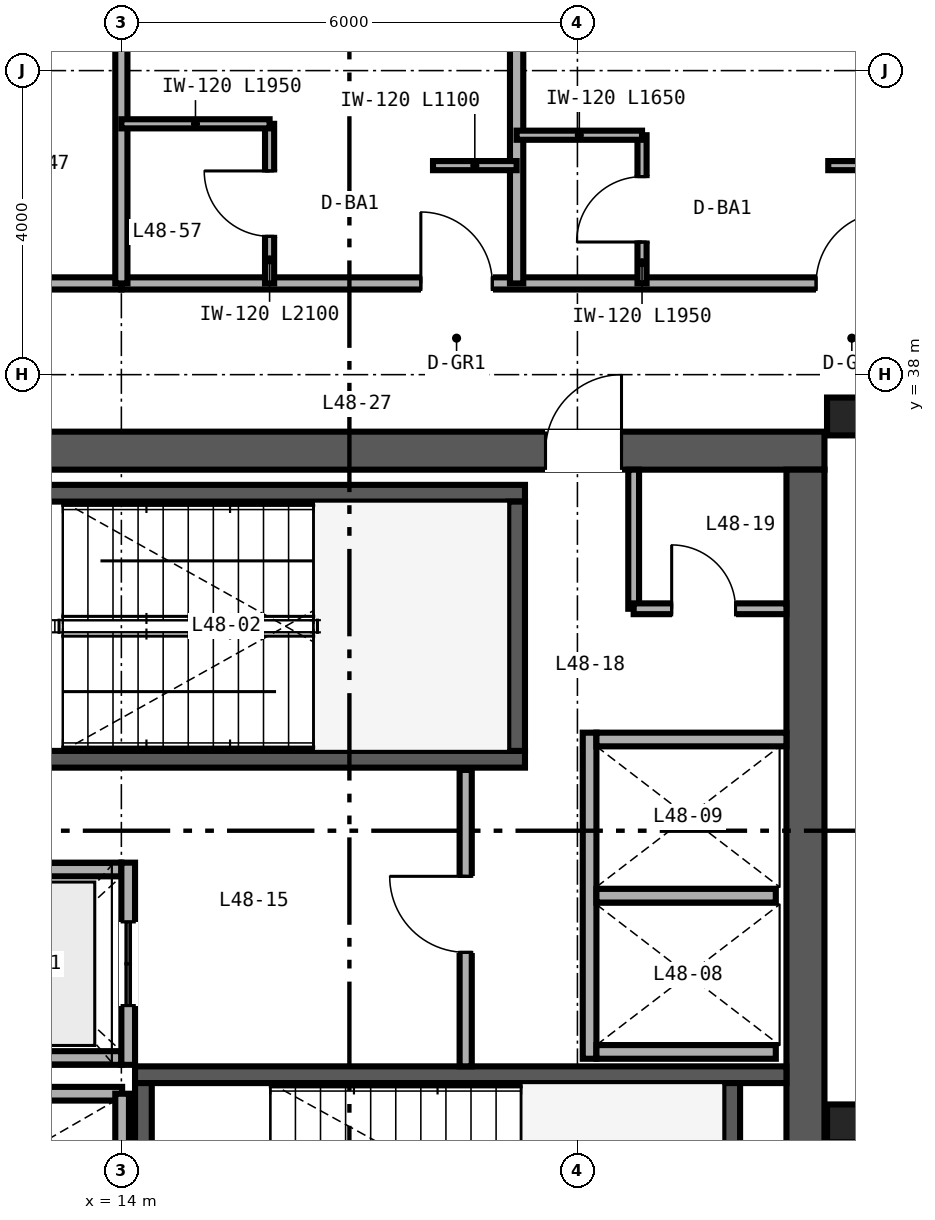
"""IFC4 building model, lengths in metres.
Left out: names, types, materials, properties, quantities, classifications, styles, units other than length and angle.
Written with IfcOpenShell. Run it as: python <this file> out.ifc"""

import sys

from ifc_helpers import new_model, si_unit, direction, frame, frame_2d, origin, origin_2d, place, context, subcontext, project, spatial, rectangle, i_section, extrude, source, transform, mapped, element, fill, save


model = new_model("IFC4")
c1 = context("Model", 3, precision=1e-05, world=origin(), true_north=direction((0.0, 1.0)))
c2 = subcontext(c1, "Body", "Model", "MODEL_VIEW")
j1 = project(units=[si_unit("LENGTHUNIT", "METRE"), si_unit("PLANEANGLEUNIT", "RADIAN")], contexts=[c1])
p1 = place(None, origin())
s1 = spatial("IfcSite", under=j1, at=p1, CompositionType="ELEMENT")
p2 = place(p1, origin())
s2 = spatial("IfcBuilding", under=s1, at=p2, CompositionType="ELEMENT")
p3 = place(p2, frame((0.0, 0.0, 192.0)))
s3 = spatial("IfcBuildingStorey", under=s2, at=p3, CompositionType="ELEMENT", Elevation=192.0)
p4 = place(p3, frame((10.75, 37.0, 0.0), z_axis=(0.0, 0.0, 1.0), x_axis=(1.0, 0.0, 0.0)))
e1 = element("IfcWall", 1, at=p4, inside=s3, PredefinedType="SHEAR", context=c2, shape_type="SweptSolid", body=[
    extrude(rectangle(XDim=12.5, YDim=0.5, at=frame_2d((6.25, 0.0))), origin(), (0.0, 0.0, 1.0), 3.37),
])
p5 = place(p4, frame((8.83, 0.0, 0.0)))
e2 = element("IfcOpeningElement", 2, at=p5, cuts=e1, PredefinedType="OPENING", context=c2, shape_type="SweptSolid", body=[
    extrude(rectangle(XDim=1.0, YDim=2.15, at=frame_2d((0.5, 1.075))), frame((0.0, 0.26, 0.0), z_axis=(0.0, -1.0, 0.0), x_axis=(1.0, 0.0, 0.0)), (0.0, 0.0, 1.0), 0.52),
])
p6 = place(p3, frame((23.0, 15.25, 0.0), z_axis=(0.0, 0.0, 1.0), x_axis=(0.0, 1.0, 0.0)))
e3 = element("IfcWall", 3, at=p6, inside=s3, PredefinedType="SHEAR", context=c2, shape_type="SweptSolid", body=[
    extrude(rectangle(XDim=21.5, YDim=0.5, at=frame_2d((10.75, 0.0))), origin(), (0.0, 0.0, 1.0), 3.37),
])
p7 = place(p3, frame((11.25, 32.94, 0.0), z_axis=(0.0, 0.0, 1.0), x_axis=(1.0, 0.0, 0.0)))
e4 = element("IfcWall", 4, at=p7, inside=s3, PredefinedType="SHEAR", context=c2, shape_type="SweptSolid", body=[
    extrude(rectangle(XDim=8.06, YDim=0.22, at=frame_2d((4.03, 0.0))), origin(), (0.0, 0.0, 1.0), 3.4),
])
p8 = place(p7, frame((0.67, 0.0, 0.0)))
e5 = element("IfcOpeningElement", 5, at=p8, cuts=e4, PredefinedType="OPENING", context=c2, shape_type="SweptSolid", body=[
    extrude(rectangle(XDim=1.05, YDim=2.15, at=frame_2d((0.525, 1.075))), frame((0.0, 0.12, 0.0), z_axis=(0.0, -1.0, 0.0), x_axis=(1.0, 0.0, 0.0)), (0.0, 0.0, 1.0), 0.24),
])
p9 = place(p3, frame((11.25, 36.44, 0.0), z_axis=(0.0, 0.0, 1.0), x_axis=(1.0, 0.0, 0.0)))
e6 = element("IfcWall", 6, at=p9, inside=s3, PredefinedType="SHEAR", context=c2, shape_type="SweptSolid", body=[
    extrude(rectangle(XDim=8.06, YDim=0.22, at=frame_2d((4.03, 0.0))), origin(), (0.0, 0.0, 1.0), 3.4),
])
p10 = place(p3, frame((19.2, 33.05, 0.0), z_axis=(0.0, 0.0, 1.0), x_axis=(0.0, 1.0, 0.0)))
e7 = element("IfcWall", 7, at=p10, inside=s3, PredefinedType="SHEAR", context=c2, shape_type="SweptSolid", body=[
    extrude(rectangle(XDim=3.28, YDim=0.22, at=frame_2d((1.64, 0.0))), origin(), (0.0, 0.0, 1.0), 3.4),
])
p11 = place(p3, frame((14.18, 28.79, 0.0), z_axis=(0.0, 0.0, 1.0), x_axis=(1.0, 0.0, 0.0)))
e8 = element("IfcWall", 8, at=p11, inside=s3, PredefinedType="SHEAR", context=c2, shape_type="SweptSolid", body=[
    extrude(rectangle(XDim=8.57, YDim=0.22, at=frame_2d((4.285, 0.0))), origin(), (0.0, 0.0, 1.0), 3.4),
])
for number, where, z_axis, x_axis in (
    (9, (14.29, 25.4, 0.0), (0.0, 0.0, 1.0), (0.0, 1.0, 0.0)),
    (10, (22.03, 25.4, 0.0), (0.0, 0.0, 1.0), (0.0, 1.0, 0.0)),
):
    element("IfcWall", number, at=place(p3, frame(where, z_axis=z_axis, x_axis=x_axis)), inside=s3, PredefinedType="SHEAR", context=c2, shape_type="SweptSolid", body=[
        extrude(rectangle(XDim=3.28, YDim=0.22, at=frame_2d((1.64, 0.0))), origin(), (0.0, 0.0, 1.0), 3.4),
    ])
m1 = source(origin(), c2, "Body", "SweptSolid", [
    extrude(i_section(OverallWidth=0.432, OverallDepth=0.498, WebThickness=0.056, FlangeThickness=0.089, FilletRadius=0.025, at=origin_2d()), origin(), (0.0, 0.0, 1.0), 3.37),
])
for number, where, z_axis, x_axis in (
    (11, (23.5, 28.15, 0.0), (0.0, 0.0, 1.0), (1.0, 0.0, 0.0)),
    (12, (23.5, 37.45, 0.0), (0.0, 0.0, 1.0), (1.0, 0.0, 0.0)),
):
    element("IfcColumn", number, at=place(p3, frame(where, z_axis=z_axis, x_axis=x_axis)), inside=s3, PredefinedType="COLUMN", context=c2, shape_type="MappedRepresentation", body=[
        mapped(m1, transform((0.0, 0.0, 0.0), scale=1.0)),
    ])
p12 = place(p3, frame((20.16, 29.0, 0.0), z_axis=(0.0, 0.0, 1.0), x_axis=(0.0, 1.0, 0.0)))
e13 = element("IfcWall", 13, at=p12, inside=s3, PredefinedType="SOLIDWALL", context=c2, shape_type="SweptSolid", body=[
    extrude(rectangle(XDim=4.29, YDim=0.18, at=frame_2d((2.145, 0.0))), origin(), (0.0, 0.0, 1.0), 3.37),
])
p13 = place(p3, frame((20.25, 29.09, 0.0), z_axis=(0.0, 0.0, 1.0), x_axis=(1.0, 0.0, 0.0)))
e14 = element("IfcWall", 14, at=p13, inside=s3, PredefinedType="SOLIDWALL", context=c2, shape_type="SweptSolid", body=[
    extrude(rectangle(XDim=2.36, YDim=0.18, at=frame_2d((1.18, 0.0))), origin(), (0.0, 0.0, 1.0), 3.37),
])
p14 = place(p3, frame((20.25, 33.2, 0.0), z_axis=(0.0, 0.0, 1.0), x_axis=(1.0, 0.0, 0.0)))
e15 = element("IfcWall", 15, at=p14, inside=s3, PredefinedType="SOLIDWALL", context=c2, shape_type="SweptSolid", body=[
    extrude(rectangle(XDim=2.5, YDim=0.18, at=frame_2d((1.25, 0.0))), origin(), (0.0, 0.0, 1.0), 3.37),
])
p15 = place(p3, frame((20.25, 31.145, 0.0), z_axis=(0.0, 0.0, 1.0), x_axis=(1.0, 0.0, 0.0)))
e16 = element("IfcWall", 16, at=p15, inside=s3, PredefinedType="SOLIDWALL", context=c2, shape_type="SweptSolid", body=[
    extrude(rectangle(XDim=2.36, YDim=0.18, at=frame_2d((1.18, 0.0))), origin(), (0.0, 0.0, 1.0), 3.37),
])
for number, where, z_axis, x_axis in (
    (17, (11.5, 29.01, 0.0), (0.0, 0.0, 1.0), (1.0, 0.0, 0.0)),
    (18, (11.5, 31.49, 0.0), (0.0, 0.0, 1.0), (1.0, 0.0, 0.0)),
):
    element("IfcWall", number, at=place(p3, frame(where, z_axis=z_axis, x_axis=x_axis)), inside=s3, PredefinedType="SOLIDWALL", context=c2, shape_type="SweptSolid", body=[
        extrude(rectangle(XDim=2.5, YDim=0.18, at=frame_2d((1.25, 0.0))), origin(), (0.0, 0.0, 1.0), 3.37),
    ])
p16 = place(p3, frame((14.09, 28.92, 0.0), z_axis=(0.0, 0.0, 1.0), x_axis=(0.0, 1.0, 0.0)))
e19 = element("IfcWall", 19, at=p16, inside=s3, PredefinedType="SOLIDWALL", context=c2, shape_type="SweptSolid", body=[
    extrude(rectangle(XDim=2.66, YDim=0.18, at=frame_2d((1.33, 0.0))), origin(), (0.0, 0.0, 1.0), 3.37),
])
p17 = place(p16, frame((0.78, 0.0, 0.0)))
e20 = element("IfcOpeningElement", 20, at=p17, cuts=e19, PredefinedType="OPENING", context=c2, shape_type="SweptSolid", body=[
    extrude(rectangle(XDim=1.1, YDim=2.2, at=frame_2d((0.55, 1.1))), frame((0.0, 0.1, 0.0), z_axis=(0.0, -1.0, 0.0), x_axis=(1.0, 0.0, 0.0)), (0.0, 0.0, 1.0), 0.2),
])
p18 = place(p3, frame((11.5, 28.54, 0.0), z_axis=(0.0, 0.0, 1.0), x_axis=(1.0, 0.0, 0.0)))
e21 = element("IfcWall", 21, at=p18, inside=s3, PredefinedType="SOLIDWALL", context=c2, shape_type="SweptSolid", body=[
    extrude(rectangle(XDim=2.51, YDim=0.18, at=frame_2d((1.255, 0.0))), origin(), (0.0, 0.0, 1.0), 3.37),
])
p19 = place(p3, frame((14.01, 25.46, 0.0), z_axis=(0.0, 0.0, 1.0), x_axis=(0.0, 1.0, 0.0)))
e22 = element("IfcWall", 22, at=p19, inside=s3, PredefinedType="SOLIDWALL", context=c2, shape_type="SweptSolid", body=[
    extrude(rectangle(XDim=3.08, YDim=0.18, at=frame_2d((1.54, 0.0))), origin(), (0.0, 0.0, 1.0), 3.37),
])
p20 = place(p3, frame((18.53, 28.9, 0.0), z_axis=(0.0, 0.0, 1.0), x_axis=(0.0, 1.0, 0.0)))
e23 = element("IfcWall", 23, at=p20, inside=s3, PredefinedType="PARTITIONING", context=c2, shape_type="SweptSolid", body=[
    extrude(rectangle(XDim=3.9, YDim=0.16, at=frame_2d((1.95, 0.0))), origin(), (0.0, 0.0, 1.0), 3.37),
])
p21 = place(p20, frame((1.5, 0.0, 0.0)))
e24 = element("IfcOpeningElement", 24, at=p21, cuts=e23, PredefinedType="OPENING", context=c2, shape_type="SweptSolid", body=[
    extrude(rectangle(XDim=1.0, YDim=2.15, at=frame_2d((0.5, 1.075))), frame((0.0, 0.09, 0.0), z_axis=(0.0, -1.0, 0.0), x_axis=(1.0, 0.0, 0.0)), (0.0, 0.0, 1.0), 0.18),
])
p22 = place(p3, frame((20.74, 34.92, 0.0), z_axis=(0.0, 0.0, 1.0), x_axis=(0.0, 1.0, 0.0)))
e25 = element("IfcWall", 25, at=p22, inside=s3, PredefinedType="PARTITIONING", context=c2, shape_type="SweptSolid", body=[
    extrude(rectangle(XDim=1.83, YDim=0.142, at=frame_2d((0.915, 0.0))), origin(), (0.0, 0.0, 1.0), 3.37),
])
p23 = place(p3, frame((20.74, 34.92, 0.0), z_axis=(0.0, 0.0, 1.0), x_axis=(1.0, 0.0, 0.0)))
e26 = element("IfcWall", 26, at=p23, inside=s3, PredefinedType="PARTITIONING", context=c2, shape_type="SweptSolid", body=[
    extrude(rectangle(XDim=2.01, YDim=0.142, at=frame_2d((1.005, 0.0))), origin(), (0.0, 0.0, 1.0), 3.37),
])
p24 = place(p23, frame((0.5, 0.0, 0.0)))
e27 = element("IfcOpeningElement", 27, at=p24, cuts=e26, PredefinedType="OPENING", context=c2, shape_type="SweptSolid", body=[
    extrude(rectangle(XDim=0.84, YDim=2.1, at=frame_2d((0.42, 1.05))), frame((0.0, 0.081, 0.0), z_axis=(0.0, -1.0, 0.0), x_axis=(1.0, 0.0, 0.0)), (0.0, 0.0, 1.0), 0.162),
])
p25 = place(p3, frame((10.0, 39.2, 0.0), z_axis=(0.0, 0.0, 1.0), x_axis=(1.0, 0.0, 0.0)))
e28 = element("IfcWall", 28, at=p25, inside=s3, PredefinedType="PARTITIONING", context=c2, shape_type="SweptSolid", body=[
    extrude(rectangle(XDim=4.0, YDim=0.16, at=frame_2d((2.0, 0.0))), origin(), (0.0, 0.0, 1.0), 3.37),
])
p26 = place(p25, frame((1.52, 0.0, 0.0)))
e29 = element("IfcOpeningElement", 29, at=p26, cuts=e28, PredefinedType="OPENING", context=c2, shape_type="SweptSolid", body=[
    extrude(rectangle(XDim=0.96, YDim=2.15, at=frame_2d((0.48, 1.075))), frame((0.0, 0.09, 0.0), z_axis=(0.0, -1.0, 0.0), x_axis=(1.0, 0.0, 0.0)), (0.0, 0.0, 1.0), 0.18),
])
p27 = place(p3, frame((14.0, 39.2, 0.0), z_axis=(0.0, 0.0, 1.0), x_axis=(1.0, 0.0, 0.0)))
e30 = element("IfcWall", 30, at=p27, inside=s3, PredefinedType="PARTITIONING", context=c2, shape_type="SweptSolid", body=[
    extrude(rectangle(XDim=36.0, YDim=0.16, at=frame_2d((18.0, 0.0))), origin(), (0.0, 0.0, 1.0), 2.913),
])
p28 = place(p27, frame((3.94, 0.0, 0.0)))
e31 = element("IfcOpeningElement", 31, at=p28, cuts=e30, PredefinedType="OPENING", context=c2, shape_type="SweptSolid", body=[
    extrude(rectangle(XDim=0.94, YDim=2.15, at=frame_2d((0.47, 1.075))), frame((0.0, 0.09, 0.0), z_axis=(0.0, -1.0, 0.0), x_axis=(1.0, 0.0, 0.0)), (0.0, 0.0, 1.0), 0.18),
])
p29 = place(p27, frame((9.14, 0.0, 0.0)))
e32 = element("IfcOpeningElement", 32, at=p29, cuts=e30, PredefinedType="OPENING", context=c2, shape_type="SweptSolid", body=[
    extrude(rectangle(XDim=0.94, YDim=2.15, at=frame_2d((0.47, 1.075))), frame((0.0, 0.09, 0.0), z_axis=(0.0, -1.0, 0.0), x_axis=(1.0, 0.0, 0.0)), (0.0, 0.0, 1.0), 0.18),
])
p30 = place(p27, frame((12.72, 0.0, 0.0)))
e33 = element("IfcOpeningElement", 33, at=p30, cuts=e30, PredefinedType="OPENING", context=c2, shape_type="SweptSolid", body=[
    extrude(rectangle(XDim=0.96, YDim=2.15, at=frame_2d((0.48, 1.075))), frame((0.0, 0.09, 0.0), z_axis=(0.0, -1.0, 0.0), x_axis=(1.0, 0.0, 0.0)), (0.0, 0.0, 1.0), 0.18),
])
p31 = place(p27, frame((18.42, 0.0, 0.0)))
e34 = element("IfcOpeningElement", 34, at=p31, cuts=e30, PredefinedType="OPENING", context=c2, shape_type="SweptSolid", body=[
    extrude(rectangle(XDim=0.96, YDim=2.15, at=frame_2d((0.48, 1.075))), frame((0.0, 0.09, 0.0), z_axis=(0.0, -1.0, 0.0), x_axis=(1.0, 0.0, 0.0)), (0.0, 0.0, 1.0), 0.18),
])
p32 = place(p27, frame((26.34, 0.0, 0.0)))
e35 = element("IfcOpeningElement", 35, at=p32, cuts=e30, PredefinedType="OPENING", context=c2, shape_type="SweptSolid", body=[
    extrude(rectangle(XDim=0.94, YDim=2.15, at=frame_2d((0.47, 1.075))), frame((0.0, 0.09, 0.0), z_axis=(0.0, -1.0, 0.0), x_axis=(1.0, 0.0, 0.0)), (0.0, 0.0, 1.0), 0.18),
])
p33 = place(p27, frame((30.54, 0.0, 0.0)))
e36 = element("IfcOpeningElement", 36, at=p33, cuts=e30, PredefinedType="OPENING", context=c2, shape_type="SweptSolid", body=[
    extrude(rectangle(XDim=0.94, YDim=2.15, at=frame_2d((0.47, 1.075))), frame((0.0, 0.09, 0.0), z_axis=(0.0, -1.0, 0.0), x_axis=(1.0, 0.0, 0.0)), (0.0, 0.0, 1.0), 0.18),
])
p34 = place(p27, frame((34.74, 0.0, 0.0)))
e37 = element("IfcOpeningElement", 37, at=p34, cuts=e30, PredefinedType="OPENING", context=c2, shape_type="SweptSolid", body=[
    extrude(rectangle(XDim=0.94, YDim=2.15, at=frame_2d((0.47, 1.075))), frame((0.0, 0.09, 0.0), z_axis=(0.0, -1.0, 0.0), x_axis=(1.0, 0.0, 0.0)), (0.0, 0.0, 1.0), 0.18),
])
p35 = place(p3, frame((14.0, 39.2, 0.0), z_axis=(0.0, 0.0, 1.0), x_axis=(0.0, 1.0, 0.0)))
e38 = element("IfcWall", 38, at=p35, inside=s3, PredefinedType="PARTITIONING", context=c2, shape_type="SweptSolid", body=[
    extrude(rectangle(XDim=6.44, YDim=0.16, at=frame_2d((3.22, 0.0))), origin(), (0.0, 0.0, 1.0), 2.677),
])
p36 = place(p3, frame((19.2, 39.2, 0.0), z_axis=(0.0, 0.0, 1.0), x_axis=(0.0, 1.0, 0.0)))
e39 = element("IfcWall", 39, at=p36, inside=s3, PredefinedType="PARTITIONING", context=c2, shape_type="SweptSolid", body=[
    extrude(rectangle(XDim=6.44, YDim=0.175, at=frame_2d((3.22, 0.0))), origin(), (0.0, 0.0, 1.0), 2.677),
])
p37 = place(p3, frame((15.95, 39.2, 0.0), z_axis=(0.0, 0.0, 1.0), x_axis=(0.0, 1.0, 0.0)))
e40 = element("IfcWall", 40, at=p37, inside=s3, PredefinedType="PARTITIONING", context=c2, shape_type="SweptSolid", body=[
    extrude(rectangle(XDim=2.1, YDim=0.12, at=frame_2d((1.05, 0.0))), origin(), (0.0, 0.0, 1.0), 3.37),
])
p38 = place(p37, frame((0.62, 0.0, 0.0)))
e41 = element("IfcOpeningElement", 41, at=p38, cuts=e40, PredefinedType="OPENING", context=c2, shape_type="SweptSolid", body=[
    extrude(rectangle(XDim=0.86, YDim=2.1, at=frame_2d((0.43, 1.05))), frame((0.0, 0.07, 0.0), z_axis=(0.0, -1.0, 0.0), x_axis=(1.0, 0.0, 0.0)), (0.0, 0.0, 1.0), 0.14),
])
p39 = place(p3, frame((14.0, 41.3, 0.0), z_axis=(0.0, 0.0, 1.0), x_axis=(1.0, 0.0, 0.0)))
e42 = element("IfcWall", 42, at=p39, inside=s3, PredefinedType="PARTITIONING", context=c2, shape_type="SweptSolid", body=[
    extrude(rectangle(XDim=1.95, YDim=0.12, at=frame_2d((0.975, 0.0))), origin(), (0.0, 0.0, 1.0), 3.37),
])
p40 = place(p3, frame((18.1, 40.75, 0.0), z_axis=(0.0, 0.0, 1.0), x_axis=(1.0, 0.0, 0.0)))
e43 = element("IfcWall", 43, at=p40, inside=s3, PredefinedType="PARTITIONING", context=c2, shape_type="SweptSolid", body=[
    extrude(rectangle(XDim=1.1, YDim=0.12, at=frame_2d((0.55, 0.0))), origin(), (0.0, 0.0, 1.0), 3.37),
])
p41 = place(p3, frame((20.85, 39.2, 0.0), z_axis=(0.0, 0.0, 1.0), x_axis=(0.0, 1.0, 0.0)))
e44 = element("IfcWall", 44, at=p41, inside=s3, PredefinedType="PARTITIONING", context=c2, shape_type="SweptSolid", body=[
    extrude(rectangle(XDim=1.95, YDim=0.12, at=frame_2d((0.975, 0.0))), origin(), (0.0, 0.0, 1.0), 3.37),
])
p42 = place(p41, frame((0.545, 0.0, 0.0)))
e45 = element("IfcOpeningElement", 45, at=p42, cuts=e44, PredefinedType="OPENING", context=c2, shape_type="SweptSolid", body=[
    extrude(rectangle(XDim=0.86, YDim=2.1, at=frame_2d((0.43, 1.05))), frame((0.0, 0.07, 0.0), z_axis=(0.0, -1.0, 0.0), x_axis=(1.0, 0.0, 0.0)), (0.0, 0.0, 1.0), 0.14),
])
p43 = place(p3, frame((19.2, 41.15, 0.0), z_axis=(0.0, 0.0, 1.0), x_axis=(1.0, 0.0, 0.0)))
e46 = element("IfcWall", 46, at=p43, inside=s3, PredefinedType="PARTITIONING", context=c2, shape_type="SweptSolid", body=[
    extrude(rectangle(XDim=1.65, YDim=0.12, at=frame_2d((0.825, 0.0))), origin(), (0.0, 0.0, 1.0), 3.37),
])
p44 = place(p3, frame((23.3, 40.75, 0.0), z_axis=(0.0, 0.0, 1.0), x_axis=(1.0, 0.0, 0.0)))
e47 = element("IfcWall", 47, at=p44, inside=s3, PredefinedType="PARTITIONING", context=c2, shape_type="SweptSolid", body=[
    extrude(rectangle(XDim=1.1, YDim=0.12, at=frame_2d((0.55, 0.0))), origin(), (0.0, 0.0, 1.0), 2.913),
])
m2 = source(origin(), c2, "Body", "SweptSolid", [
    extrude(rectangle(XDim=1.1, YDim=2.2, at=frame_2d((0.55, 1.1))), frame((0.0, 0.025, 0.0), z_axis=(0.0, -1.0, 0.0), x_axis=(1.0, 0.0, 0.0)), (0.0, 0.0, 1.0), 0.05),
])
p45 = place(p17, origin())
e48 = element("IfcDoor", 48, at=p45, inside=s3, OperationType="DOUBLE_DOOR_SLIDING", PredefinedType="DOOR", context=c2, shape_type="MappedRepresentation", body=[
    mapped(m2, transform((0.0, 0.0, 0.0), scale=1.0)),
])
fill(e20, e48)
m3 = source(origin(), c2, "Body", "SweptSolid", [
    extrude(rectangle(XDim=1.0, YDim=2.15, at=frame_2d((0.5, 1.075))), frame((0.0, 0.025, 0.0), z_axis=(0.0, -1.0, 0.0), x_axis=(1.0, 0.0, 0.0)), (0.0, 0.0, 1.0), 0.05),
])
p46 = place(p21, origin())
e49 = element("IfcDoor", 49, at=p46, inside=s3, OperationType="SINGLE_SWING_RIGHT", PredefinedType="DOOR", context=c2, shape_type="MappedRepresentation", body=[
    mapped(m3, transform((0.0, 0.0, 0.0), scale=1.0)),
])
fill(e24, e49)
m4 = source(origin(), c2, "Body", "SweptSolid", [
    extrude(rectangle(XDim=0.84, YDim=2.1, at=frame_2d((0.42, 1.05))), frame((0.0, 0.025, 0.0), z_axis=(0.0, -1.0, 0.0), x_axis=(1.0, 0.0, 0.0)), (0.0, 0.0, 1.0), 0.05),
])
p47 = place(p24, origin())
e50 = element("IfcDoor", 50, at=p47, inside=s3, OperationType="SINGLE_SWING_LEFT", PredefinedType="DOOR", context=c2, shape_type="MappedRepresentation", body=[
    mapped(m4, transform((0.0, 0.0, 0.0), scale=1.0)),
])
fill(e27, e50)
p48 = place(p5, origin())
e51 = element("IfcDoor", 51, at=p48, inside=s3, OperationType="SINGLE_SWING_RIGHT", PredefinedType="DOOR", context=c2, shape_type="MappedRepresentation", body=[
    mapped(m3, transform((0.0, 0.0, 0.0), scale=1.0)),
])
fill(e2, e51)
m5 = source(origin(), c2, "Body", "SweptSolid", [
    extrude(rectangle(XDim=0.86, YDim=2.1, at=frame_2d((0.43, 1.05))), frame((0.0, 0.025, 0.0), z_axis=(0.0, -1.0, 0.0), x_axis=(1.0, 0.0, 0.0)), (0.0, 0.0, 1.0), 0.05),
])
p49 = place(p38, origin())
e52 = element("IfcDoor", 52, at=p49, inside=s3, OperationType="SINGLE_SWING_RIGHT", PredefinedType="DOOR", context=c2, shape_type="MappedRepresentation", body=[
    mapped(m5, transform((0.0, 0.0, 0.0), scale=1.0)),
])
fill(e41, e52)
p50 = place(p42, origin())
e53 = element("IfcDoor", 53, at=p50, inside=s3, OperationType="SINGLE_SWING_LEFT", PredefinedType="DOOR", context=c2, shape_type="MappedRepresentation", body=[
    mapped(m5, transform((0.0, 0.0, 0.0), scale=1.0)),
])
fill(e45, e53)
m6 = source(origin(), c2, "Body", "SweptSolid", [
    extrude(rectangle(XDim=0.94, YDim=2.15, at=frame_2d((0.47, 1.075))), frame((0.0, 0.025, 0.0), z_axis=(0.0, -1.0, 0.0), x_axis=(1.0, 0.0, 0.0)), (0.0, 0.0, 1.0), 0.05),
])
p51 = place(p28, origin())
e54 = element("IfcDoor", 54, at=p51, inside=s3, OperationType="SINGLE_SWING_LEFT", PredefinedType="DOOR", context=c2, shape_type="MappedRepresentation", body=[
    mapped(m6, transform((0.0, 0.0, 0.0), scale=1.0)),
])
fill(e31, e54)
p52 = place(p29, origin())
e55 = element("IfcDoor", 55, at=p52, inside=s3, OperationType="SINGLE_SWING_RIGHT", PredefinedType="DOOR", context=c2, shape_type="MappedRepresentation", body=[
    mapped(m6, transform((0.0, 0.0, 0.0), scale=1.0)),
])
fill(e32, e55)
save(model, sys.argv[1])
